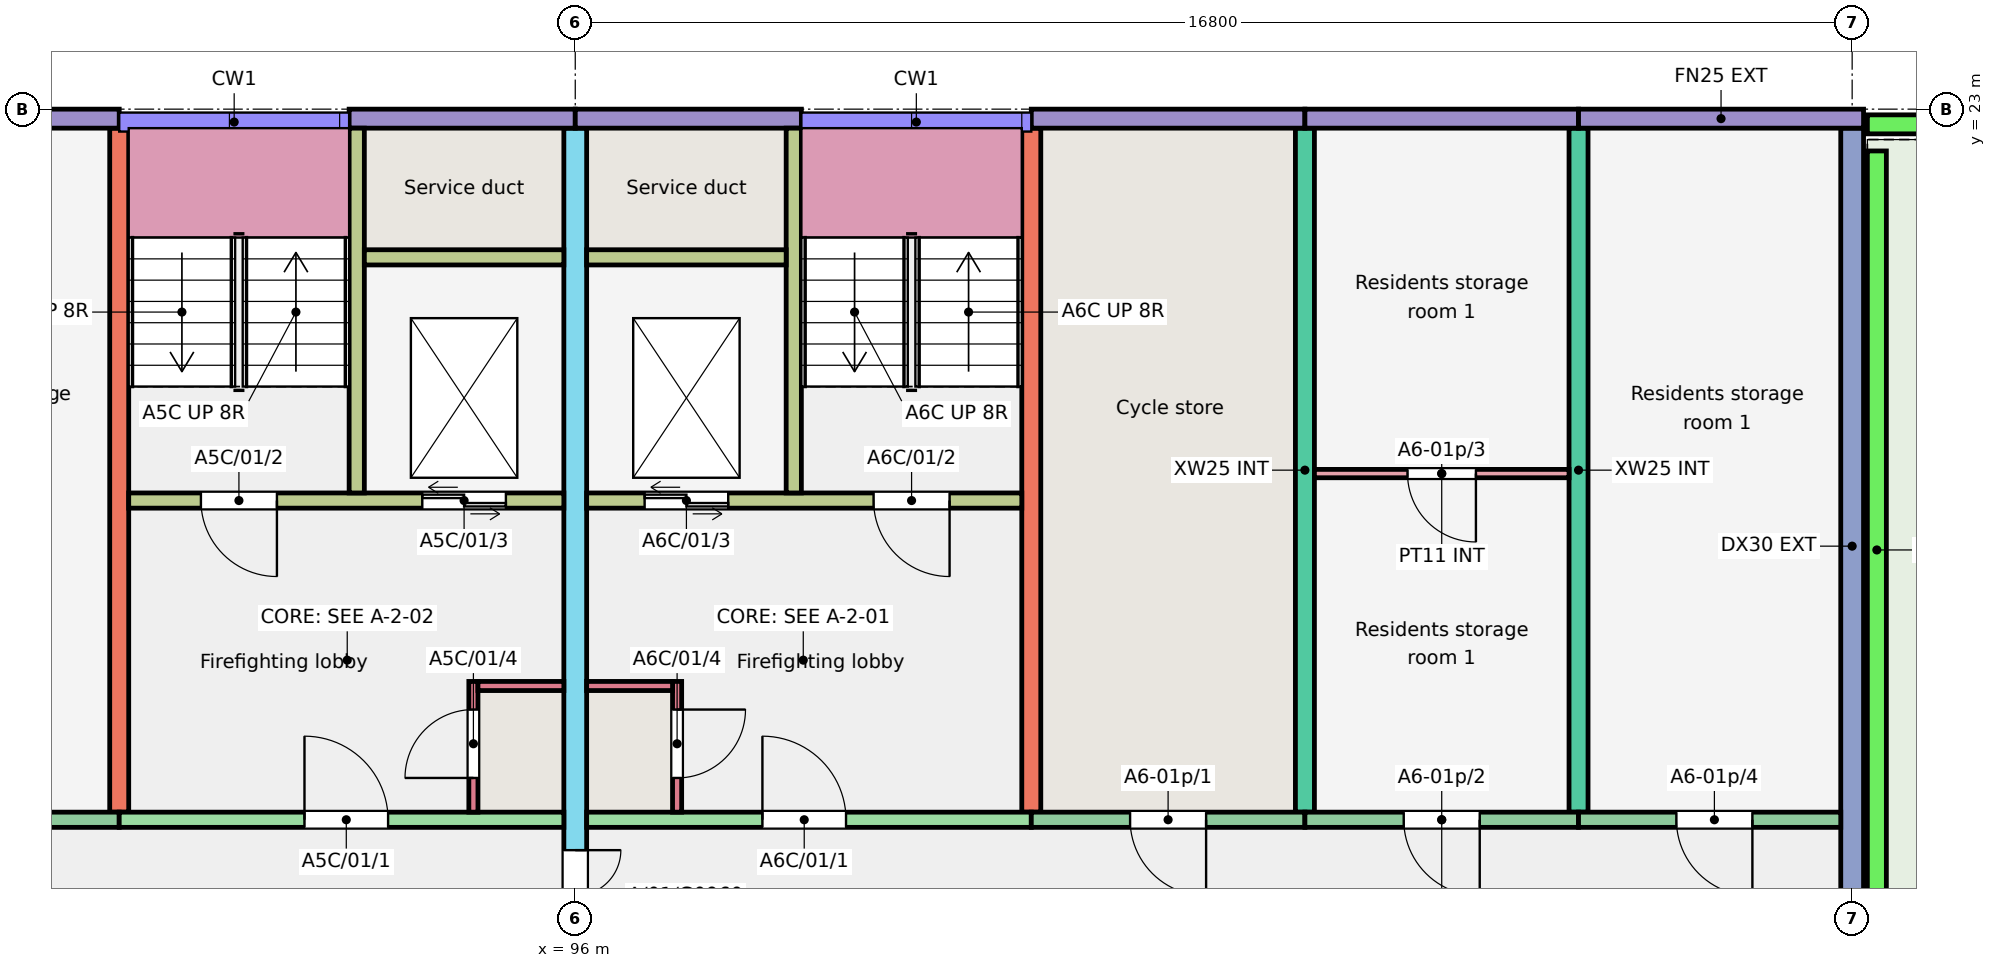
"""IFC4 building model, lengths in metres.
Left out: names, types, materials, properties, quantities, classifications, styles, units other than length and angle.
Written with IfcOpenShell. Run it as: python <this file> out.ifc"""

import sys

from ifc_helpers import new_model, si_unit, direction, frame, frame_2d, origin, place, context, subcontext, project, spatial, rectangle, extrude, element, fill, save


model = new_model("IFC4")
c1 = context("Model", 3, precision=1e-05, world=origin(), true_north=direction((0.0, 1.0)))
c2 = subcontext(c1, "Body", "Model", "MODEL_VIEW")
j1 = project(units=[si_unit("LENGTHUNIT", "METRE"), si_unit("PLANEANGLEUNIT", "RADIAN")], contexts=[c1])
p1 = place(None, origin())
s1 = spatial("IfcSite", under=j1, at=p1, CompositionType="ELEMENT")
p2 = place(p1, origin())
s2 = spatial("IfcBuilding", under=s1, at=p2, CompositionType="ELEMENT")
p3 = place(p2, frame((0.0, 0.0, 3.0)))
s3 = spatial("IfcBuildingStorey", under=s2, at=p3, CompositionType="ELEMENT", Elevation=3.0)
p4 = place(p3, frame((90.0, 13.75, 0.0), z_axis=(0.0, 0.0, 1.0), x_axis=(0.0, 1.0, 0.0)))
e1 = element("IfcWall", 1, at=p4, inside=s3, PredefinedType="SHEAR", context=c2, shape_type="SweptSolid", body=[
    extrude(rectangle(XDim=9.0, YDim=0.25, at=frame_2d((4.5, 0.0))), origin(), (0.0, 0.0, 1.0), 3.0),
])
p5 = place(p3, frame((96.0, 11.75, 0.0), z_axis=(0.0, 0.0, 1.0), x_axis=(0.0, 1.0, 0.0)))
e2 = element("IfcWall", 2, at=p5, inside=s3, PredefinedType="SHEAR", context=c2, shape_type="SweptSolid", body=[
    extrude(rectangle(XDim=11.0, YDim=0.3, at=frame_2d((5.5, 0.0))), origin(), (0.0, 0.0, 1.0), 3.0),
])
p6 = place(p5, frame((0.3, 0.0, 0.0)))
e3 = element("IfcOpeningElement", 3, at=p6, cuts=e2, PredefinedType="OPENING", context=c2, shape_type="SweptSolid", body=[
    extrude(rectangle(XDim=1.2, YDim=2.1, at=frame_2d((0.6, 1.05))), frame((0.0, 0.16, 0.0), z_axis=(0.0, -1.0, 0.0), x_axis=(1.0, 0.0, 0.0)), (0.0, 0.0, 1.0), 0.32),
])
for number, where, z_axis, x_axis in (
    (4, (102.0, 13.75, 0.0), (0.0, 0.0, 1.0), (0.0, 1.0, 0.0)),
    (5, (105.6, 13.75, 0.0), (0.0, 0.0, 1.0), (0.0, 1.0, 0.0)),
    (6, (109.2, 13.75, 0.0), (0.0, 0.0, 1.0), (0.0, 1.0, 0.0)),
):
    element("IfcWall", number, at=place(p3, frame(where, z_axis=z_axis, x_axis=x_axis)), inside=s3, PredefinedType="SHEAR", context=c2, shape_type="SweptSolid", body=[
        extrude(rectangle(XDim=9.0, YDim=0.25, at=frame_2d((4.5, 0.0))), origin(), (0.0, 0.0, 1.0), 3.0),
    ])
p7 = place(p3, frame((112.8, 11.75, 0.0), z_axis=(0.0, 0.0, 1.0), x_axis=(0.0, 1.0, 0.0)))
e7 = element("IfcWall", 7, at=p7, inside=s3, PredefinedType="SHEAR", context=c2, shape_type="SweptSolid", body=[
    extrude(rectangle(XDim=11.0, YDim=0.3, at=frame_2d((5.5, 0.0))), origin(), (0.0, 0.0, 1.0), 3.0),
])
p8 = place(p3, frame((86.4, 22.875, 0.0), z_axis=(0.0, 0.0, 1.0), x_axis=(1.0, 0.0, 0.0)))
e8 = element("IfcWall", 8, at=p8, inside=s3, PredefinedType="SOLIDWALL", context=c2, shape_type="SweptSolid", body=[
    extrude(rectangle(XDim=3.6, YDim=0.25, at=frame_2d((1.8, 0.0))), origin(), (0.0, 0.0, 1.0), 3.0),
])
p9 = place(p3, frame((86.4, 13.65, 0.0), z_axis=(0.0, 0.0, 1.0), x_axis=(1.0, 0.0, 0.0)))
e9 = element("IfcWall", 9, at=p9, inside=s3, PredefinedType="SOLIDWALL", context=c2, shape_type="SweptSolid", body=[
    extrude(rectangle(XDim=3.6, YDim=0.2, at=frame_2d((1.8, 0.0))), origin(), (0.0, 0.0, 1.0), 3.0),
])
p10 = place(p9, frame((1.3, 0.0, 0.0)))
e10 = element("IfcOpeningElement", 10, at=p10, cuts=e9, PredefinedType="OPENING", context=c2, shape_type="SweptSolid", body=[
    extrude(rectangle(XDim=1.0, YDim=2.1, at=frame_2d((0.5, 1.05))), frame((0.0, 0.11, 0.0), z_axis=(0.0, -1.0, 0.0), x_axis=(1.0, 0.0, 0.0)), (0.0, 0.0, 1.0), 0.22),
])
p11 = place(p3, frame((93.025, 22.875, 0.0), z_axis=(0.0, 0.0, 1.0), x_axis=(1.0, 0.0, 0.0)))
e11 = element("IfcWall", 11, at=p11, inside=s3, PredefinedType="SOLIDWALL", context=c2, shape_type="SweptSolid", body=[
    extrude(rectangle(XDim=2.975, YDim=0.25, at=frame_2d((1.488, 0.0))), origin(), (0.0, 0.0, 1.0), 3.0),
])
p12 = place(p3, frame((90.0, 13.65, 0.0), z_axis=(0.0, 0.0, 1.0), x_axis=(1.0, 0.0, 0.0)))
e12 = element("IfcWall", 12, at=p12, inside=s3, PredefinedType="SHEAR", context=c2, shape_type="SweptSolid", body=[
    extrude(rectangle(XDim=5.85, YDim=0.2, at=frame_2d((2.925, 0.0))), origin(), (0.0, 0.0, 1.0), 3.0),
])
p13 = place(p12, frame((2.438, 0.0, 0.0)))
e13 = element("IfcOpeningElement", 13, at=p13, cuts=e12, PredefinedType="OPENING", context=c2, shape_type="SweptSolid", body=[
    extrude(rectangle(XDim=1.1, YDim=2.1, at=frame_2d((0.55, 1.05))), frame((0.0, 0.11, 0.0), z_axis=(0.0, -1.0, 0.0), x_axis=(1.0, 0.0, 0.0)), (0.0, 0.0, 1.0), 0.22),
])
p14 = place(p3, frame((90.125, 17.85, 0.0), z_axis=(0.0, 0.0, 1.0), x_axis=(1.0, 0.0, 0.0)))
e14 = element("IfcWall", 14, at=p14, inside=s3, PredefinedType="SHEAR", context=c2, shape_type="SweptSolid", body=[
    extrude(rectangle(XDim=5.725, YDim=0.2, at=frame_2d((2.863, 0.0))), origin(), (0.0, 0.0, 1.0), 3.0),
])
p15 = place(p14, frame((0.95, 0.0, 0.0)))
e15 = element("IfcOpeningElement", 15, at=p15, cuts=e14, PredefinedType="OPENING", context=c2, shape_type="SweptSolid", body=[
    extrude(rectangle(XDim=1.0, YDim=2.1, at=frame_2d((0.5, 1.05))), frame((0.0, 0.11, 0.0), z_axis=(0.0, -1.0, 0.0), x_axis=(1.0, 0.0, 0.0)), (0.0, 0.0, 1.0), 0.22),
])
p16 = place(p14, frame((3.863, 0.0, 0.0)))
e16 = element("IfcOpeningElement", 16, at=p16, cuts=e14, PredefinedType="OPENING", context=c2, shape_type="SweptSolid", body=[
    extrude(rectangle(XDim=1.1, YDim=2.1, at=frame_2d((0.55, 1.05))), frame((0.0, 0.11, 0.0), z_axis=(0.0, -1.0, 0.0), x_axis=(1.0, 0.0, 0.0)), (0.0, 0.0, 1.0), 0.22),
])
p17 = place(p3, frame((93.125, 17.95, 0.0), z_axis=(0.0, 0.0, 1.0), x_axis=(0.0, 1.0, 0.0)))
e17 = element("IfcWall", 17, at=p17, inside=s3, PredefinedType="SHEAR", context=c2, shape_type="SweptSolid", body=[
    extrude(rectangle(XDim=4.8, YDim=0.2, at=frame_2d((2.4, 0.0))), origin(), (0.0, 0.0, 1.0), 3.0),
])
p18 = place(p3, frame((93.225, 21.05, 0.0), z_axis=(0.0, 0.0, 1.0), x_axis=(1.0, 0.0, 0.0)))
e18 = element("IfcWall", 18, at=p18, inside=s3, PredefinedType="SHEAR", context=c2, shape_type="SweptSolid", body=[
    extrude(rectangle(XDim=2.625, YDim=0.2, at=frame_2d((1.312, 0.0))), origin(), (0.0, 0.0, 1.0), 3.0),
])
p19 = place(p3, frame((94.66, 13.75, 0.0), z_axis=(0.0, 0.0, 1.0), x_axis=(0.0, 1.0, 0.0)))
e19 = element("IfcWall", 19, at=p19, inside=s3, PredefinedType="SHEAR", context=c2, shape_type="SweptSolid", body=[
    extrude(rectangle(XDim=1.72, YDim=0.12, at=frame_2d((0.86, 0.0))), origin(), (0.0, 0.0, 1.0), 3.0),
])
p20 = place(p19, frame((0.45, 0.0, 0.0)))
e20 = element("IfcOpeningElement", 20, at=p20, cuts=e19, PredefinedType="OPENING", context=c2, shape_type="SweptSolid", body=[
    extrude(rectangle(XDim=0.9, YDim=2.1, at=frame_2d((0.45, 1.05))), frame((0.0, 0.07, 0.0), z_axis=(0.0, -1.0, 0.0), x_axis=(1.0, 0.0, 0.0)), (0.0, 0.0, 1.0), 0.14),
])
p21 = place(p3, frame((94.72, 15.41, 0.0), z_axis=(0.0, 0.0, 1.0), x_axis=(1.0, 0.0, 0.0)))
e21 = element("IfcWall", 21, at=p21, inside=s3, PredefinedType="SHEAR", context=c2, shape_type="SweptSolid", body=[
    extrude(rectangle(XDim=1.13, YDim=0.12, at=frame_2d((0.565, 0.0))), origin(), (0.0, 0.0, 1.0), 3.0),
])
p22 = place(p3, frame((96.0, 22.875, 0.0), z_axis=(0.0, 0.0, 1.0), x_axis=(1.0, 0.0, 0.0)))
e22 = element("IfcWall", 22, at=p22, inside=s3, PredefinedType="SOLIDWALL", context=c2, shape_type="SweptSolid", body=[
    extrude(rectangle(XDim=2.975, YDim=0.25, at=frame_2d((1.488, 0.0))), origin(), (0.0, 0.0, 1.0), 3.0),
])
p23 = place(p3, frame((96.15, 13.65, 0.0), z_axis=(0.0, 0.0, 1.0), x_axis=(1.0, 0.0, 0.0)))
e23 = element("IfcWall", 23, at=p23, inside=s3, PredefinedType="SHEAR", context=c2, shape_type="SweptSolid", body=[
    extrude(rectangle(XDim=5.85, YDim=0.2, at=frame_2d((2.925, 0.0))), origin(), (0.0, 0.0, 1.0), 3.0),
])
p24 = place(p23, frame((2.312, 0.0, 0.0)))
e24 = element("IfcOpeningElement", 24, at=p24, cuts=e23, PredefinedType="OPENING", context=c2, shape_type="SweptSolid", body=[
    extrude(rectangle(XDim=1.1, YDim=2.1, at=frame_2d((0.55, 1.05))), frame((0.0, 0.11, 0.0), z_axis=(0.0, -1.0, 0.0), x_axis=(1.0, 0.0, 0.0)), (0.0, 0.0, 1.0), 0.22),
])
p25 = place(p3, frame((96.15, 17.85, 0.0), z_axis=(0.0, 0.0, 1.0), x_axis=(1.0, 0.0, 0.0)))
e25 = element("IfcWall", 25, at=p25, inside=s3, PredefinedType="SHEAR", context=c2, shape_type="SweptSolid", body=[
    extrude(rectangle(XDim=5.725, YDim=0.2, at=frame_2d((2.863, 0.0))), origin(), (0.0, 0.0, 1.0), 3.0),
])
p26 = place(p25, frame((3.775, 0.0, 0.0)))
e26 = element("IfcOpeningElement", 26, at=p26, cuts=e25, PredefinedType="OPENING", context=c2, shape_type="SweptSolid", body=[
    extrude(rectangle(XDim=1.0, YDim=2.1, at=frame_2d((0.5, 1.05))), frame((0.0, 0.11, 0.0), z_axis=(0.0, -1.0, 0.0), x_axis=(1.0, 0.0, 0.0)), (0.0, 0.0, 1.0), 0.22),
])
p27 = place(p25, frame((0.762, 0.0, 0.0)))
e27 = element("IfcOpeningElement", 27, at=p27, cuts=e25, PredefinedType="OPENING", context=c2, shape_type="SweptSolid", body=[
    extrude(rectangle(XDim=1.1, YDim=2.1, at=frame_2d((0.55, 1.05))), frame((0.0, 0.11, 0.0), z_axis=(0.0, -1.0, 0.0), x_axis=(1.0, 0.0, 0.0)), (0.0, 0.0, 1.0), 0.22),
])
p28 = place(p3, frame((98.875, 17.95, 0.0), z_axis=(0.0, 0.0, 1.0), x_axis=(0.0, 1.0, 0.0)))
e28 = element("IfcWall", 28, at=p28, inside=s3, PredefinedType="SHEAR", context=c2, shape_type="SweptSolid", body=[
    extrude(rectangle(XDim=4.8, YDim=0.2, at=frame_2d((2.4, 0.0))), origin(), (0.0, 0.0, 1.0), 3.0),
])
p29 = place(p3, frame((96.15, 21.05, 0.0), z_axis=(0.0, 0.0, 1.0), x_axis=(1.0, 0.0, 0.0)))
e29 = element("IfcWall", 29, at=p29, inside=s3, PredefinedType="SHEAR", context=c2, shape_type="SweptSolid", body=[
    extrude(rectangle(XDim=2.625, YDim=0.2, at=frame_2d((1.312, 0.0))), origin(), (0.0, 0.0, 1.0), 3.0),
])
p30 = place(p3, frame((97.34, 13.75, 0.0), z_axis=(0.0, 0.0, 1.0), x_axis=(0.0, 1.0, 0.0)))
e30 = element("IfcWall", 30, at=p30, inside=s3, PredefinedType="SHEAR", context=c2, shape_type="SweptSolid", body=[
    extrude(rectangle(XDim=1.72, YDim=0.12, at=frame_2d((0.86, 0.0))), origin(), (0.0, 0.0, 1.0), 3.0),
])
p31 = place(p30, frame((0.45, 0.0, 0.0)))
e31 = element("IfcOpeningElement", 31, at=p31, cuts=e30, PredefinedType="OPENING", context=c2, shape_type="SweptSolid", body=[
    extrude(rectangle(XDim=0.9, YDim=2.1, at=frame_2d((0.45, 1.05))), frame((0.0, 0.07, 0.0), z_axis=(0.0, -1.0, 0.0), x_axis=(1.0, 0.0, 0.0)), (0.0, 0.0, 1.0), 0.14),
])
p32 = place(p3, frame((96.15, 15.41, 0.0), z_axis=(0.0, 0.0, 1.0), x_axis=(1.0, 0.0, 0.0)))
e32 = element("IfcWall", 32, at=p32, inside=s3, PredefinedType="SHEAR", context=c2, shape_type="SweptSolid", body=[
    extrude(rectangle(XDim=1.13, YDim=0.12, at=frame_2d((0.565, 0.0))), origin(), (0.0, 0.0, 1.0), 3.0),
])
p33 = place(p3, frame((102.0, 22.875, 0.0), z_axis=(0.0, 0.0, 1.0), x_axis=(1.0, 0.0, 0.0)))
e33 = element("IfcWall", 33, at=p33, inside=s3, PredefinedType="SOLIDWALL", context=c2, shape_type="SweptSolid", body=[
    extrude(rectangle(XDim=3.6, YDim=0.25, at=frame_2d((1.8, 0.0))), origin(), (0.0, 0.0, 1.0), 3.0),
])
p34 = place(p3, frame((102.0, 13.65, 0.0), z_axis=(0.0, 0.0, 1.0), x_axis=(1.0, 0.0, 0.0)))
e34 = element("IfcWall", 34, at=p34, inside=s3, PredefinedType="SOLIDWALL", context=c2, shape_type="SweptSolid", body=[
    extrude(rectangle(XDim=3.6, YDim=0.2, at=frame_2d((1.8, 0.0))), origin(), (0.0, 0.0, 1.0), 3.0),
])
p35 = place(p34, frame((1.3, 0.0, 0.0)))
e35 = element("IfcOpeningElement", 35, at=p35, cuts=e34, PredefinedType="OPENING", context=c2, shape_type="SweptSolid", body=[
    extrude(rectangle(XDim=1.0, YDim=2.1, at=frame_2d((0.5, 1.05))), frame((0.0, 0.11, 0.0), z_axis=(0.0, -1.0, 0.0), x_axis=(1.0, 0.0, 0.0)), (0.0, 0.0, 1.0), 0.22),
])
p36 = place(p3, frame((105.6, 22.875, 0.0), z_axis=(0.0, 0.0, 1.0), x_axis=(1.0, 0.0, 0.0)))
e36 = element("IfcWall", 36, at=p36, inside=s3, PredefinedType="SOLIDWALL", context=c2, shape_type="SweptSolid", body=[
    extrude(rectangle(XDim=3.6, YDim=0.25, at=frame_2d((1.8, 0.0))), origin(), (0.0, 0.0, 1.0), 3.0),
])
p37 = place(p3, frame((105.6, 13.65, 0.0), z_axis=(0.0, 0.0, 1.0), x_axis=(1.0, 0.0, 0.0)))
e37 = element("IfcWall", 37, at=p37, inside=s3, PredefinedType="SOLIDWALL", context=c2, shape_type="SweptSolid", body=[
    extrude(rectangle(XDim=3.6, YDim=0.2, at=frame_2d((1.8, 0.0))), origin(), (0.0, 0.0, 1.0), 3.0),
])
p38 = place(p37, frame((1.3, 0.0, 0.0)))
e38 = element("IfcOpeningElement", 38, at=p38, cuts=e37, PredefinedType="OPENING", context=c2, shape_type="SweptSolid", body=[
    extrude(rectangle(XDim=1.0, YDim=2.1, at=frame_2d((0.5, 1.05))), frame((0.0, 0.11, 0.0), z_axis=(0.0, -1.0, 0.0), x_axis=(1.0, 0.0, 0.0)), (0.0, 0.0, 1.0), 0.22),
])
p39 = place(p3, frame((109.2, 22.875, 0.0), z_axis=(0.0, 0.0, 1.0), x_axis=(1.0, 0.0, 0.0)))
e39 = element("IfcWall", 39, at=p39, inside=s3, PredefinedType="SOLIDWALL", context=c2, shape_type="SweptSolid", body=[
    extrude(rectangle(XDim=3.75, YDim=0.25, at=frame_2d((1.875, 0.0))), origin(), (0.0, 0.0, 1.0), 3.0),
])
p40 = place(p3, frame((109.2, 13.65, 0.0), z_axis=(0.0, 0.0, 1.0), x_axis=(1.0, 0.0, 0.0)))
e40 = element("IfcWall", 40, at=p40, inside=s3, PredefinedType="SOLIDWALL", context=c2, shape_type="SweptSolid", body=[
    extrude(rectangle(XDim=3.45, YDim=0.2, at=frame_2d((1.725, 0.0))), origin(), (0.0, 0.0, 1.0), 3.0),
])
p41 = place(p40, frame((1.288, 0.0, 0.0)))
e41 = element("IfcOpeningElement", 41, at=p41, cuts=e40, PredefinedType="OPENING", context=c2, shape_type="SweptSolid", body=[
    extrude(rectangle(XDim=1.0, YDim=2.1, at=frame_2d((0.5, 1.05))), frame((0.0, 0.11, 0.0), z_axis=(0.0, -1.0, 0.0), x_axis=(1.0, 0.0, 0.0)), (0.0, 0.0, 1.0), 0.22),
])
p42 = place(p3, frame((113.0, 22.8, 0.0), z_axis=(0.0, 0.0, 1.0), x_axis=(1.0, 0.0, 0.0)))
e42 = element("IfcWall", 42, at=p42, inside=s3, PredefinedType="PARAPET", context=c2, shape_type="SweptSolid", body=[
    extrude(rectangle(XDim=13.8, YDim=0.25, at=frame_2d((6.9, 0.0))), origin(), (0.0, 0.0, 1.0), 1.1),
])
p43 = place(p3, frame((113.125, 11.95, 0.0), z_axis=(0.0, 0.0, 1.0), x_axis=(0.0, 1.0, 0.0)))
e43 = element("IfcWall", 43, at=p43, inside=s3, PredefinedType="PARAPET", context=c2, shape_type="SweptSolid", body=[
    extrude(rectangle(XDim=10.5, YDim=0.25, at=frame_2d((5.25, 0.0))), origin(), (0.0, 0.0, 1.0), 1.1),
])
p44 = place(p3, frame((105.725, 18.205, 0.0), z_axis=(0.0, 0.0, 1.0), x_axis=(1.0, 0.0, 0.0)))
e44 = element("IfcWall", 44, at=p44, inside=s3, PredefinedType="PARTITIONING", context=c2, shape_type="SweptSolid", body=[
    extrude(rectangle(XDim=3.35, YDim=0.11, at=frame_2d((1.675, 0.0))), origin(), (0.0, 0.0, 1.0), 2.8),
])
p45 = place(p44, frame((1.225, 0.0, 0.0)))
e45 = element("IfcOpeningElement", 45, at=p45, cuts=e44, PredefinedType="OPENING", context=c2, shape_type="SweptSolid", body=[
    extrude(rectangle(XDim=0.9, YDim=2.1, at=frame_2d((0.45, 1.05))), frame((0.0, 0.065, 0.0), z_axis=(0.0, -1.0, 0.0), x_axis=(1.0, 0.0, 0.0)), (0.0, 0.0, 1.0), 0.13),
])
p46 = place(p35, origin())
e46 = element("IfcDoor", 46, at=p46, inside=s3, OperationType="SINGLE_SWING_RIGHT", PredefinedType="DOOR", context=c2, shape_type="SweptSolid", body=[
    extrude(rectangle(XDim=1.0, YDim=2.1, at=frame_2d((0.5, 1.05))), frame((0.0, 0.025, 0.0), z_axis=(0.0, -1.0, 0.0), x_axis=(1.0, 0.0, 0.0)), (0.0, 0.0, 1.0), 0.05),
])
fill(e35, e46)
p47 = place(p38, origin())
e47 = element("IfcDoor", 47, at=p47, inside=s3, OperationType="SINGLE_SWING_RIGHT", PredefinedType="DOOR", context=c2, shape_type="SweptSolid", body=[
    extrude(rectangle(XDim=1.0, YDim=2.1, at=frame_2d((0.5, 1.05))), frame((0.0, 0.025, 0.0), z_axis=(0.0, -1.0, 0.0), x_axis=(1.0, 0.0, 0.0)), (0.0, 0.0, 1.0), 0.05),
])
fill(e38, e47)
p48 = place(p45, origin())
e48 = element("IfcDoor", 48, at=p48, inside=s3, OperationType="SINGLE_SWING_RIGHT", PredefinedType="DOOR", context=c2, shape_type="SweptSolid", body=[
    extrude(rectangle(XDim=0.9, YDim=2.1, at=frame_2d((0.45, 1.05))), frame((0.0, 0.025, 0.0), z_axis=(0.0, -1.0, 0.0), x_axis=(1.0, 0.0, 0.0)), (0.0, 0.0, 1.0), 0.05),
])
fill(e45, e48)
p49 = place(p41, origin())
e49 = element("IfcDoor", 49, at=p49, inside=s3, OperationType="SINGLE_SWING_RIGHT", PredefinedType="DOOR", context=c2, shape_type="SweptSolid", body=[
    extrude(rectangle(XDim=1.0, YDim=2.1, at=frame_2d((0.5, 1.05))), frame((0.0, 0.025, 0.0), z_axis=(0.0, -1.0, 0.0), x_axis=(1.0, 0.0, 0.0)), (0.0, 0.0, 1.0), 0.05),
])
fill(e41, e49)
p50 = place(p13, origin())
e50 = element("IfcDoor", 50, at=p50, inside=s3, OperationType="SINGLE_SWING_LEFT", PredefinedType="DOOR", context=c2, shape_type="SweptSolid", body=[
    extrude(rectangle(XDim=1.1, YDim=2.1, at=frame_2d((0.55, 1.05))), frame((0.0, 0.025, 0.0), z_axis=(0.0, -1.0, 0.0), x_axis=(1.0, 0.0, 0.0)), (0.0, 0.0, 1.0), 0.05),
])
fill(e13, e50)
p51 = place(p15, origin())
e51 = element("IfcDoor", 51, at=p51, inside=s3, OperationType="SINGLE_SWING_RIGHT", PredefinedType="DOOR", context=c2, shape_type="SweptSolid", body=[
    extrude(rectangle(XDim=1.0, YDim=2.1, at=frame_2d((0.5, 1.05))), frame((0.0, 0.025, 0.0), z_axis=(0.0, -1.0, 0.0), x_axis=(1.0, 0.0, 0.0)), (0.0, 0.0, 1.0), 0.05),
])
fill(e15, e51)
p52 = place(p16, origin())
e52 = element("IfcDoor", 52, at=p52, inside=s3, OperationType="DOUBLE_DOOR_SLIDING", PredefinedType="DOOR", context=c2, shape_type="SweptSolid", body=[
    extrude(rectangle(XDim=1.1, YDim=2.1, at=frame_2d((0.55, 1.05))), frame((0.0, 0.025, 0.0), z_axis=(0.0, -1.0, 0.0), x_axis=(1.0, 0.0, 0.0)), (0.0, 0.0, 1.0), 0.05),
])
fill(e16, e52)
p53 = place(p20, origin())
e53 = element("IfcDoor", 53, at=p53, inside=s3, OperationType="SINGLE_SWING_LEFT", PredefinedType="DOOR", context=c2, shape_type="SweptSolid", body=[
    extrude(rectangle(XDim=0.9, YDim=2.1, at=frame_2d((0.45, 1.05))), frame((0.0, 0.025, 0.0), z_axis=(0.0, -1.0, 0.0), x_axis=(1.0, 0.0, 0.0)), (0.0, 0.0, 1.0), 0.05),
])
fill(e20, e53)
p54 = place(p24, origin())
e54 = element("IfcDoor", 54, at=p54, inside=s3, OperationType="SINGLE_SWING_LEFT", PredefinedType="DOOR", context=c2, shape_type="SweptSolid", body=[
    extrude(rectangle(XDim=1.1, YDim=2.1, at=frame_2d((0.55, 1.05))), frame((0.0, 0.025, 0.0), z_axis=(0.0, -1.0, 0.0), x_axis=(1.0, 0.0, 0.0)), (0.0, 0.0, 1.0), 0.05),
])
fill(e24, e54)
p55 = place(p26, origin())
e55 = element("IfcDoor", 55, at=p55, inside=s3, OperationType="SINGLE_SWING_RIGHT", PredefinedType="DOOR", context=c2, shape_type="SweptSolid", body=[
    extrude(rectangle(XDim=1.0, YDim=2.1, at=frame_2d((0.5, 1.05))), frame((0.0, 0.025, 0.0), z_axis=(0.0, -1.0, 0.0), x_axis=(1.0, 0.0, 0.0)), (0.0, 0.0, 1.0), 0.05),
])
fill(e26, e55)
p56 = place(p27, origin())
e56 = element("IfcDoor", 56, at=p56, inside=s3, OperationType="DOUBLE_DOOR_SLIDING", PredefinedType="DOOR", context=c2, shape_type="SweptSolid", body=[
    extrude(rectangle(XDim=1.1, YDim=2.1, at=frame_2d((0.55, 1.05))), frame((0.0, 0.025, 0.0), z_axis=(0.0, -1.0, 0.0), x_axis=(1.0, 0.0, 0.0)), (0.0, 0.0, 1.0), 0.05),
])
fill(e27, e56)
p57 = place(p31, origin())
e57 = element("IfcDoor", 57, at=p57, inside=s3, OperationType="SINGLE_SWING_RIGHT", PredefinedType="DOOR", context=c2, shape_type="SweptSolid", body=[
    extrude(rectangle(XDim=0.9, YDim=2.1, at=frame_2d((0.45, 1.05))), frame((0.0, 0.025, 0.0), z_axis=(0.0, -1.0, 0.0), x_axis=(1.0, 0.0, 0.0)), (0.0, 0.0, 1.0), 0.05),
])
fill(e31, e57)
p58 = place(p6, origin())
e58 = element("IfcDoor", 58, at=p58, inside=s3, OperationType="DOUBLE_DOOR_SINGLE_SWING", PredefinedType="DOOR", context=c2, shape_type="SweptSolid", body=[
    extrude(rectangle(XDim=1.2, YDim=2.1, at=frame_2d((0.6, 1.05))), frame((0.0, 0.025, 0.0), z_axis=(0.0, -1.0, 0.0), x_axis=(1.0, 0.0, 0.0)), (0.0, 0.0, 1.0), 0.05),
])
fill(e3, e58)
save(model, sys.argv[1])
